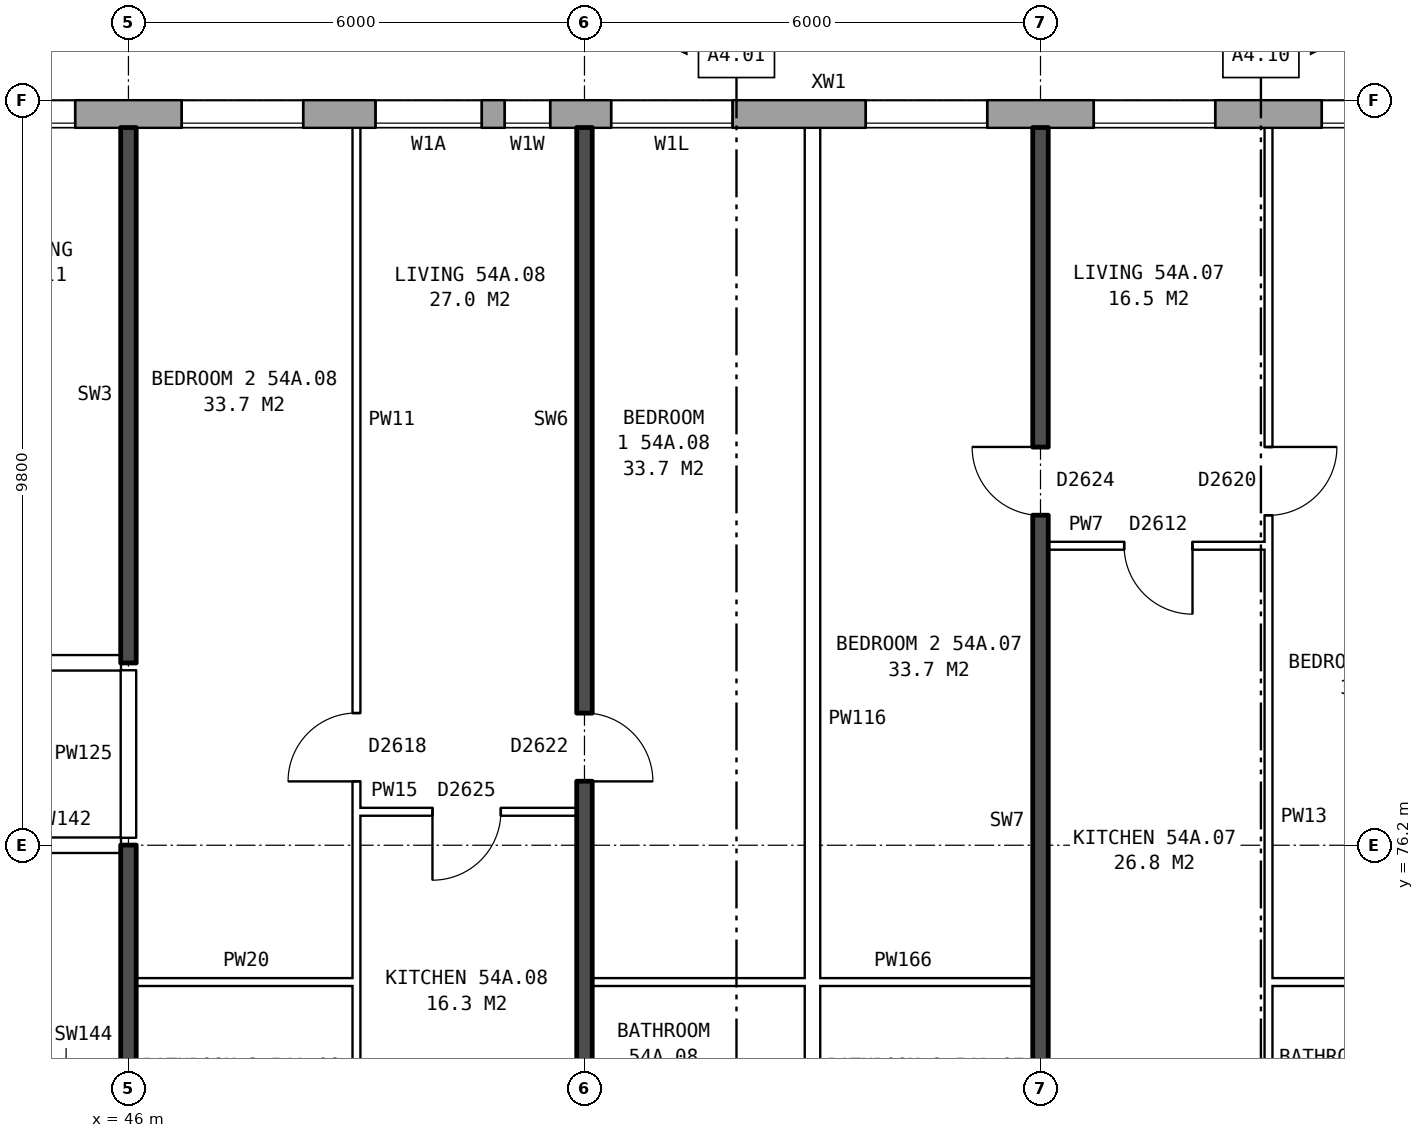
"""IFC4 building model, lengths in metres.
Left out: names, types, materials, properties, quantities, classifications, styles, units other than length and angle.
Written with IfcOpenShell. Run it as: python <this file> out.ifc"""

import sys

from ifc_helpers import new_model, si_unit, direction, frame, frame_2d, origin, place, context, subcontext, project, spatial, rectangle, extrude, element, fill, save


model = new_model("IFC4")
c1 = context("Model", 3, precision=1e-05, world=origin(), true_north=direction((0.0, 1.0)))
c2 = subcontext(c1, "Body", "Model", "MODEL_VIEW")
j1 = project(units=[si_unit("LENGTHUNIT", "METRE"), si_unit("PLANEANGLEUNIT", "RADIAN")], contexts=[c1])
p1 = place(None, origin())
s1 = spatial("IfcSite", under=j1, at=p1, CompositionType="ELEMENT")
p2 = place(p1, origin())
s2 = spatial("IfcBuilding", under=s1, at=p2, CompositionType="ELEMENT")
p3 = place(p2, frame((0.0, 0.0, 191.3)))
s3 = spatial("IfcBuildingStorey", under=s2, at=p3, CompositionType="ELEMENT", Elevation=191.3)
p4 = place(p3, frame((72.925, 85.82, 0.0), z_axis=(0.0, 0.0, 1.0), x_axis=(-1.0, 0.0, 0.0)))
e1 = element("IfcWall", 1, at=p4, inside=s3, PredefinedType="STANDARD", context=c2, shape_type="SweptSolid", body=[
    extrude(rectangle(XDim=39.601, YDim=0.36, at=frame_2d((19.8, 0.0))), origin(), (0.0, 0.0, 1.0), 2.85),
])
p5 = place(p4, frame((0.625, 0.0, 0.8)))
e2 = element("IfcOpeningElement", 2, at=p5, cuts=e1, PredefinedType="OPENING", context=c2, shape_type="SweptSolid", body=[
    extrude(rectangle(XDim=1.6, YDim=1.8, at=frame_2d((0.8, 0.9))), frame((0.0, 0.19, 0.0), z_axis=(0.0, -1.0, 0.0), x_axis=(1.0, 0.0, 0.0)), (0.0, 0.0, 1.0), 0.38),
])
p6 = place(p4, frame((3.625, 0.0, 0.8)))
e3 = element("IfcOpeningElement", 3, at=p6, cuts=e1, PredefinedType="OPENING", context=c2, shape_type="SweptSolid", body=[
    extrude(rectangle(XDim=1.6, YDim=1.8, at=frame_2d((0.8, 0.9))), frame((0.0, 0.19, 0.0), z_axis=(0.0, -1.0, 0.0), x_axis=(1.0, 0.0, 0.0)), (0.0, 0.0, 1.0), 0.38),
])
p7 = place(p4, frame((6.625, 0.0, 0.8)))
e4 = element("IfcOpeningElement", 4, at=p7, cuts=e1, PredefinedType="OPENING", context=c2, shape_type="SweptSolid", body=[
    extrude(rectangle(XDim=1.6, YDim=1.8, at=frame_2d((0.8, 0.9))), frame((0.0, 0.19, 0.0), z_axis=(0.0, -1.0, 0.0), x_axis=(1.0, 0.0, 0.0)), (0.0, 0.0, 1.0), 0.38),
])
p8 = place(p4, frame((9.625, 0.0, 0.8)))
e5 = element("IfcOpeningElement", 5, at=p8, cuts=e1, PredefinedType="OPENING", context=c2, shape_type="SweptSolid", body=[
    extrude(rectangle(XDim=1.6, YDim=1.8, at=frame_2d((0.8, 0.9))), frame((0.0, 0.19, 0.0), z_axis=(0.0, -1.0, 0.0), x_axis=(1.0, 0.0, 0.0)), (0.0, 0.0, 1.0), 0.38),
])
p9 = place(p4, frame((12.625, 0.0, 0.8)))
e6 = element("IfcOpeningElement", 6, at=p9, cuts=e1, PredefinedType="OPENING", context=c2, shape_type="SweptSolid", body=[
    extrude(rectangle(XDim=1.6, YDim=1.8, at=frame_2d((0.8, 0.9))), frame((0.0, 0.19, 0.0), z_axis=(0.0, -1.0, 0.0), x_axis=(1.0, 0.0, 0.0)), (0.0, 0.0, 1.0), 0.38),
])
p10 = place(p4, frame((15.625, 0.0, 0.8)))
e7 = element("IfcOpeningElement", 7, at=p10, cuts=e1, PredefinedType="OPENING", context=c2, shape_type="SweptSolid", body=[
    extrude(rectangle(XDim=1.6, YDim=1.8, at=frame_2d((0.8, 0.9))), frame((0.0, 0.19, 0.0), z_axis=(0.0, -1.0, 0.0), x_axis=(1.0, 0.0, 0.0)), (0.0, 0.0, 1.0), 0.38),
])
p11 = place(p4, frame((18.975, 0.0, 0.15)))
e8 = element("IfcOpeningElement", 8, at=p11, cuts=e1, PredefinedType="OPENING", context=c2, shape_type="SweptSolid", body=[
    extrude(rectangle(XDim=1.6, YDim=1.2, at=frame_2d((0.8, 0.6))), frame((0.0, 0.19, 0.0), z_axis=(0.0, -1.0, 0.0), x_axis=(1.0, 0.0, 0.0)), (0.0, 0.0, 1.0), 0.38),
])
p12 = place(p4, frame((21.375, 0.0, 1.7)))
e9 = element("IfcOpeningElement", 9, at=p12, cuts=e1, PredefinedType="OPENING", context=c2, shape_type="SweptSolid", body=[
    extrude(rectangle(XDim=0.6, YDim=0.9, at=frame_2d((0.3, 0.45))), frame((0.0, 0.19, 0.0), z_axis=(0.0, -1.0, 0.0), x_axis=(1.0, 0.0, 0.0)), (0.0, 0.0, 1.0), 0.38),
])
p13 = place(p4, frame((24.625, 0.0, 0.8)))
e10 = element("IfcOpeningElement", 10, at=p13, cuts=e1, PredefinedType="OPENING", context=c2, shape_type="SweptSolid", body=[
    extrude(rectangle(XDim=1.6, YDim=1.8, at=frame_2d((0.8, 0.9))), frame((0.0, 0.19, 0.0), z_axis=(0.0, -1.0, 0.0), x_axis=(1.0, 0.0, 0.0)), (0.0, 0.0, 1.0), 0.38),
])
p14 = place(p4, frame((27.625, 0.0, 0.8)))
e11 = element("IfcOpeningElement", 11, at=p14, cuts=e1, PredefinedType="OPENING", context=c2, shape_type="SweptSolid", body=[
    extrude(rectangle(XDim=1.6, YDim=1.8, at=frame_2d((0.8, 0.9))), frame((0.0, 0.19, 0.0), z_axis=(0.0, -1.0, 0.0), x_axis=(1.0, 0.0, 0.0)), (0.0, 0.0, 1.0), 0.38),
])
p15 = place(p4, frame((30.625, 0.0, 0.8)))
e12 = element("IfcOpeningElement", 12, at=p15, cuts=e1, PredefinedType="OPENING", context=c2, shape_type="SweptSolid", body=[
    extrude(rectangle(XDim=1.6, YDim=1.8, at=frame_2d((0.8, 0.9))), frame((0.0, 0.19, 0.0), z_axis=(0.0, -1.0, 0.0), x_axis=(1.0, 0.0, 0.0)), (0.0, 0.0, 1.0), 0.38),
])
p16 = place(p4, frame((33.625, 0.0, 0.8)))
e13 = element("IfcOpeningElement", 13, at=p16, cuts=e1, PredefinedType="OPENING", context=c2, shape_type="SweptSolid", body=[
    extrude(rectangle(XDim=1.6, YDim=1.8, at=frame_2d((0.8, 0.9))), frame((0.0, 0.19, 0.0), z_axis=(0.0, -1.0, 0.0), x_axis=(1.0, 0.0, 0.0)), (0.0, 0.0, 1.0), 0.38),
])
p17 = place(p4, frame((36.625, 0.0, 0.8)))
e14 = element("IfcOpeningElement", 14, at=p17, cuts=e1, PredefinedType="OPENING", context=c2, shape_type="SweptSolid", body=[
    extrude(rectangle(XDim=1.6, YDim=1.8, at=frame_2d((0.8, 0.9))), frame((0.0, 0.19, 0.0), z_axis=(0.0, -1.0, 0.0), x_axis=(1.0, 0.0, 0.0)), (0.0, 0.0, 1.0), 0.38),
])
p18 = place(p4, frame((22.275, 0.0, 0.8)))
e15 = element("IfcOpeningElement", 15, at=p18, cuts=e1, PredefinedType="OPENING", context=c2, shape_type="SweptSolid", body=[
    extrude(rectangle(XDim=1.4, YDim=1.8, at=frame_2d((0.7, 0.9))), frame((0.0, 0.19, 0.0), z_axis=(0.0, -1.0, 0.0), x_axis=(1.0, 0.0, 0.0)), (0.0, 0.0, 1.0), 0.38),
])
p19 = place(p3, frame((46.1, 74.4, 0.0), z_axis=(0.0, 0.0, 1.0), x_axis=(1.0, 0.0, 0.0)))
e16 = element("IfcWall", 16, at=p19, inside=s3, PredefinedType="PARTITIONING", context=c2, shape_type="SweptSolid", body=[
    extrude(rectangle(XDim=2.9, YDim=0.1, at=frame_2d((1.45, 0.0))), origin(), (0.0, 0.0, 1.0), 2.85),
])
p20 = place(p3, frame((52.1, 74.4, 0.0), z_axis=(0.0, 0.0, 1.0), x_axis=(1.0, 0.0, 0.0)))
e17 = element("IfcWall", 17, at=p20, inside=s3, PredefinedType="PARTITIONING", context=c2, shape_type="SweptSolid", body=[
    extrude(rectangle(XDim=5.8, YDim=0.1, at=frame_2d((2.9, 0.0))), origin(), (0.0, 0.0, 1.0), 2.85),
])
p21 = place(p3, frame((61.0, 74.4, 0.0), z_axis=(0.0, 0.0, 1.0), x_axis=(1.0, 0.0, 0.0)))
e18 = element("IfcWall", 18, at=p21, inside=s3, PredefinedType="PARTITIONING", context=c2, shape_type="SweptSolid", body=[
    extrude(rectangle(XDim=2.64, YDim=0.1, at=frame_2d((1.32, 0.0))), origin(), (0.0, 0.0, 1.0), 2.85),
])
p22 = place(p3, frame((44.36, 76.2, 0.0), z_axis=(0.0, 0.0, 1.0), x_axis=(1.0, 0.0, 0.0)))
e19 = element("IfcWall", 19, at=p22, inside=s3, PredefinedType="PARTITIONING", context=c2, shape_type="SweptSolid", body=[
    extrude(rectangle(XDim=1.54, YDim=0.2, at=frame_2d((0.77, 0.0))), origin(), (0.0, 0.0, 1.0), 2.85),
])
p23 = place(p3, frame((49.0, 76.64, 0.0), z_axis=(0.0, 0.0, 1.0), x_axis=(1.0, 0.0, 0.0)))
e20 = element("IfcWall", 20, at=p23, inside=s3, PredefinedType="PARTITIONING", context=c2, shape_type="SweptSolid", body=[
    extrude(rectangle(XDim=2.9, YDim=0.1, at=frame_2d((1.45, 0.0))), origin(), (0.0, 0.0, 1.0), 2.85),
])
p24 = place(p23, frame((1.0, 0.0, 0.0)))
e21 = element("IfcOpeningElement", 21, at=p24, cuts=e20, PredefinedType="OPENING", context=c2, shape_type="SweptSolid", body=[
    extrude(rectangle(XDim=0.9, YDim=2.1, at=frame_2d((0.45, 1.05))), frame((0.0, 0.06, 0.0), z_axis=(0.0, -1.0, 0.0), x_axis=(1.0, 0.0, 0.0)), (0.0, 0.0, 1.0), 0.12),
])
p25 = place(p3, frame((30.61, 78.6, 0.0), z_axis=(0.0, 0.0, 1.0), x_axis=(1.0, 0.0, 0.0)))
e22 = element("IfcWall", 22, at=p25, inside=s3, PredefinedType="PARTITIONING", context=c2, shape_type="SweptSolid", body=[
    extrude(rectangle(XDim=15.29, YDim=0.2, at=frame_2d((7.645, 0.0))), origin(), (0.0, 0.0, 1.0), 2.85),
])
p26 = place(p25, frame((12.84, 0.0, 0.0)))
e23 = element("IfcOpeningElement", 23, at=p26, cuts=e22, PredefinedType="OPENING", context=c2, shape_type="SweptSolid", body=[
    extrude(rectangle(XDim=1.0, YDim=2.1, at=frame_2d((0.5, 1.05))), frame((0.0, 0.11, 0.0), z_axis=(0.0, -1.0, 0.0), x_axis=(1.0, 0.0, 0.0)), (0.0, 0.0, 1.0), 0.22),
])
p27 = place(p25, frame((5.89, 0.0, 0.0)))
e24 = element("IfcOpeningElement", 24, at=p27, cuts=e22, PredefinedType="OPENING", context=c2, shape_type="SweptSolid", body=[
    extrude(rectangle(XDim=1.0, YDim=2.1, at=frame_2d((0.5, 1.05))), frame((0.0, 0.11, 0.0), z_axis=(0.0, -1.0, 0.0), x_axis=(1.0, 0.0, 0.0)), (0.0, 0.0, 1.0), 0.22),
])
p28 = place(p3, frame((58.1, 80.14, 0.0), z_axis=(0.0, 0.0, 1.0), x_axis=(1.0, 0.0, 0.0)))
e25 = element("IfcWall", 25, at=p28, inside=s3, PredefinedType="PARTITIONING", context=c2, shape_type="SweptSolid", body=[
    extrude(rectangle(XDim=2.9, YDim=0.1, at=frame_2d((1.45, 0.0))), origin(), (0.0, 0.0, 1.0), 2.85),
])
p29 = place(p28, frame((1.0, 0.0, 0.0)))
e26 = element("IfcOpeningElement", 26, at=p29, cuts=e25, PredefinedType="OPENING", context=c2, shape_type="SweptSolid", body=[
    extrude(rectangle(XDim=0.9, YDim=2.1, at=frame_2d((0.45, 1.05))), frame((0.0, 0.06, 0.0), z_axis=(0.0, -1.0, 0.0), x_axis=(1.0, 0.0, 0.0)), (0.0, 0.0, 1.0), 0.12),
])
p30 = place(p3, frame((46.0, 71.2, 0.0), z_axis=(0.0, 0.0, 1.0), x_axis=(0.0, 1.0, 0.0)))
e27 = element("IfcWall", 27, at=p30, inside=s3, PredefinedType="SOLIDWALL", context=c2, shape_type="SweptSolid", body=[
    extrude(rectangle(XDim=5.0, YDim=0.2, at=frame_2d((2.5, 0.0))), origin(), (0.0, 0.0, 1.0), 2.85),
])
p31 = place(p3, frame((46.0, 76.3, 0.0), z_axis=(0.0, 0.0, 1.0), x_axis=(0.0, 1.0, 0.0)))
e28 = element("IfcWall", 28, at=p31, inside=s3, PredefinedType="PARTITIONING", context=c2, shape_type="SweptSolid", body=[
    extrude(rectangle(XDim=2.2, YDim=0.2, at=frame_2d((1.1, 0.0))), origin(), (0.0, 0.0, 1.0), 2.85),
])
p32 = place(p3, frame((46.0, 78.6, 0.0), z_axis=(0.0, 0.0, 1.0), x_axis=(0.0, 1.0, 0.0)))
e29 = element("IfcWall", 29, at=p32, inside=s3, PredefinedType="SOLIDWALL", context=c2, shape_type="SweptSolid", body=[
    extrude(rectangle(XDim=7.04, YDim=0.2, at=frame_2d((3.52, 0.0))), origin(), (0.0, 0.0, 1.0), 2.85),
])
p33 = place(p3, frame((49.0, 71.3, 0.0), z_axis=(0.0, 0.0, 1.0), x_axis=(0.0, 1.0, 0.0)))
e30 = element("IfcWall", 30, at=p33, inside=s3, PredefinedType="PARTITIONING", context=c2, shape_type="SweptSolid", body=[
    extrude(rectangle(XDim=14.34, YDim=0.1, at=frame_2d((7.17, 0.0))), origin(), (0.0, 0.0, 1.0), 2.85),
])
p34 = place(p33, frame((5.74, 0.0, 0.0)))
e31 = element("IfcOpeningElement", 31, at=p34, cuts=e30, PredefinedType="OPENING", context=c2, shape_type="SweptSolid", body=[
    extrude(rectangle(XDim=0.9, YDim=2.1, at=frame_2d((0.45, 1.05))), frame((0.0, 0.06, 0.0), z_axis=(0.0, -1.0, 0.0), x_axis=(1.0, 0.0, 0.0)), (0.0, 0.0, 1.0), 0.12),
])
p35 = place(p33, frame((0.4, 0.0, 0.0)))
e32 = element("IfcOpeningElement", 32, at=p35, cuts=e30, PredefinedType="OPENING", context=c2, shape_type="SweptSolid", body=[
    extrude(rectangle(XDim=0.9, YDim=2.1, at=frame_2d((0.45, 1.05))), frame((0.0, 0.06, 0.0), z_axis=(0.0, -1.0, 0.0), x_axis=(1.0, 0.0, 0.0)), (0.0, 0.0, 1.0), 0.12),
])
p36 = place(p3, frame((52.0, 71.2, 0.0), z_axis=(0.0, 0.0, 1.0), x_axis=(0.0, 1.0, 0.0)))
e33 = element("IfcWall", 33, at=p36, inside=s3, PredefinedType="SOLIDWALL", context=c2, shape_type="SweptSolid", body=[
    extrude(rectangle(XDim=14.44, YDim=0.2, at=frame_2d((7.22, 0.0))), origin(), (0.0, 0.0, 1.0), 2.85),
])
p37 = place(p36, frame((5.84, 0.0, 0.0)))
e34 = element("IfcOpeningElement", 34, at=p37, cuts=e33, PredefinedType="OPENING", context=c2, shape_type="SweptSolid", body=[
    extrude(rectangle(XDim=0.9, YDim=2.1, at=frame_2d((0.45, 1.05))), frame((0.0, 0.11, 0.0), z_axis=(0.0, -1.0, 0.0), x_axis=(1.0, 0.0, 0.0)), (0.0, 0.0, 1.0), 0.22),
])
p38 = place(p36, frame((0.4, 0.0, 0.0)))
e35 = element("IfcOpeningElement", 35, at=p38, cuts=e33, PredefinedType="OPENING", context=c2, shape_type="SweptSolid", body=[
    extrude(rectangle(XDim=0.9, YDim=2.1, at=frame_2d((0.45, 1.05))), frame((0.0, 0.11, 0.0), z_axis=(0.0, -1.0, 0.0), x_axis=(1.0, 0.0, 0.0)), (0.0, 0.0, 1.0), 0.22),
])
p39 = place(p3, frame((55.0, 71.3, 0.0), z_axis=(0.0, 0.0, 1.0), x_axis=(0.0, 1.0, 0.0)))
e36 = element("IfcWall", 36, at=p39, inside=s3, PredefinedType="PARTITIONING", context=c2, shape_type="SweptSolid", body=[
    extrude(rectangle(XDim=14.34, YDim=0.2, at=frame_2d((7.17, 0.0))), origin(), (0.0, 0.0, 1.0), 2.85),
])
p40 = place(p3, frame((58.0, 71.2, 0.0), z_axis=(0.0, 0.0, 1.0), x_axis=(0.0, 1.0, 0.0)))
e37 = element("IfcWall", 37, at=p40, inside=s3, PredefinedType="SOLIDWALL", context=c2, shape_type="SweptSolid", body=[
    extrude(rectangle(XDim=14.44, YDim=0.2, at=frame_2d((7.22, 0.0))), origin(), (0.0, 0.0, 1.0), 2.85),
])
p41 = place(p40, frame((9.34, 0.0, 0.0)))
e38 = element("IfcOpeningElement", 38, at=p41, cuts=e37, PredefinedType="OPENING", context=c2, shape_type="SweptSolid", body=[
    extrude(rectangle(XDim=0.9, YDim=2.1, at=frame_2d((0.45, 1.05))), frame((0.0, 0.11, 0.0), z_axis=(0.0, -1.0, 0.0), x_axis=(1.0, 0.0, 0.0)), (0.0, 0.0, 1.0), 0.22),
])
p42 = place(p40, frame((0.4, 0.0, 0.0)))
e39 = element("IfcOpeningElement", 39, at=p42, cuts=e37, PredefinedType="OPENING", context=c2, shape_type="SweptSolid", body=[
    extrude(rectangle(XDim=0.9, YDim=2.1, at=frame_2d((0.45, 1.05))), frame((0.0, 0.11, 0.0), z_axis=(0.0, -1.0, 0.0), x_axis=(1.0, 0.0, 0.0)), (0.0, 0.0, 1.0), 0.22),
])
p43 = place(p3, frame((61.0, 71.3, 0.0), z_axis=(0.0, 0.0, 1.0), x_axis=(0.0, 1.0, 0.0)))
e40 = element("IfcWall", 40, at=p43, inside=s3, PredefinedType="PARTITIONING", context=c2, shape_type="SweptSolid", body=[
    extrude(rectangle(XDim=14.34, YDim=0.1, at=frame_2d((7.17, 0.0))), origin(), (0.0, 0.0, 1.0), 2.85),
])
p44 = place(p43, frame((9.24, 0.0, 0.0)))
e41 = element("IfcOpeningElement", 41, at=p44, cuts=e40, PredefinedType="OPENING", context=c2, shape_type="SweptSolid", body=[
    extrude(rectangle(XDim=0.9, YDim=2.1, at=frame_2d((0.45, 1.05))), frame((0.0, 0.06, 0.0), z_axis=(0.0, -1.0, 0.0), x_axis=(1.0, 0.0, 0.0)), (0.0, 0.0, 1.0), 0.12),
])
p45 = place(p43, frame((0.4, 0.0, 0.0)))
e42 = element("IfcOpeningElement", 42, at=p45, cuts=e40, PredefinedType="OPENING", context=c2, shape_type="SweptSolid", body=[
    extrude(rectangle(XDim=0.9, YDim=2.1, at=frame_2d((0.45, 1.05))), frame((0.0, 0.06, 0.0), z_axis=(0.0, -1.0, 0.0), x_axis=(1.0, 0.0, 0.0)), (0.0, 0.0, 1.0), 0.12),
])
p46 = place(p8, origin())
e43 = element("IfcWindow", 43, at=p46, inside=s3, PartitioningType="SINGLE_PANEL", PredefinedType="WINDOW", context=c2, shape_type="SweptSolid", body=[
    extrude(rectangle(XDim=1.6, YDim=1.8, at=frame_2d((0.8, 0.9))), frame((0.0, 0.15, 0.0), z_axis=(0.0, -1.0, 0.0), x_axis=(1.0, 0.0, 0.0)), (0.0, 0.0, 1.0), 0.06),
])
fill(e5, e43)
p47 = place(p9, origin())
e44 = element("IfcWindow", 44, at=p47, inside=s3, PartitioningType="SINGLE_PANEL", PredefinedType="WINDOW", context=c2, shape_type="SweptSolid", body=[
    extrude(rectangle(XDim=1.6, YDim=1.8, at=frame_2d((0.8, 0.9))), frame((0.0, 0.15, 0.0), z_axis=(0.0, -1.0, 0.0), x_axis=(1.0, 0.0, 0.0)), (0.0, 0.0, 1.0), 0.06),
])
fill(e6, e44)
p48 = place(p10, origin())
e45 = element("IfcWindow", 45, at=p48, inside=s3, PartitioningType="SINGLE_PANEL", PredefinedType="WINDOW", context=c2, shape_type="SweptSolid", body=[
    extrude(rectangle(XDim=1.6, YDim=1.8, at=frame_2d((0.8, 0.9))), frame((0.0, 0.15, 0.0), z_axis=(0.0, -1.0, 0.0), x_axis=(1.0, 0.0, 0.0)), (0.0, 0.0, 1.0), 0.06),
])
fill(e7, e45)
p49 = place(p11, origin())
e46 = element("IfcWindow", 46, at=p49, inside=s3, PartitioningType="SINGLE_PANEL", PredefinedType="WINDOW", context=c2, shape_type="SweptSolid", body=[
    extrude(rectangle(XDim=1.6, YDim=1.2, at=frame_2d((0.8, 0.6))), frame((0.0, 0.15, 0.0), z_axis=(0.0, -1.0, 0.0), x_axis=(1.0, 0.0, 0.0)), (0.0, 0.0, 1.0), 0.06),
])
fill(e8, e46)
p50 = place(p12, origin())
e47 = element("IfcWindow", 47, at=p50, inside=s3, PartitioningType="SINGLE_PANEL", PredefinedType="WINDOW", context=c2, shape_type="SweptSolid", body=[
    extrude(rectangle(XDim=0.6, YDim=0.9, at=frame_2d((0.3, 0.45))), frame((0.0, 0.15, 0.0), z_axis=(0.0, -1.0, 0.0), x_axis=(1.0, 0.0, 0.0)), (0.0, 0.0, 1.0), 0.06),
])
fill(e9, e47)
p51 = place(p13, origin())
e48 = element("IfcWindow", 48, at=p51, inside=s3, PartitioningType="SINGLE_PANEL", PredefinedType="WINDOW", context=c2, shape_type="SweptSolid", body=[
    extrude(rectangle(XDim=1.6, YDim=1.8, at=frame_2d((0.8, 0.9))), frame((0.0, 0.15, 0.0), z_axis=(0.0, -1.0, 0.0), x_axis=(1.0, 0.0, 0.0)), (0.0, 0.0, 1.0), 0.06),
])
fill(e10, e48)
p52 = place(p14, origin())
e49 = element("IfcWindow", 49, at=p52, inside=s3, PartitioningType="SINGLE_PANEL", PredefinedType="WINDOW", context=c2, shape_type="SweptSolid", body=[
    extrude(rectangle(XDim=1.6, YDim=1.8, at=frame_2d((0.8, 0.9))), frame((0.0, 0.15, 0.0), z_axis=(0.0, -1.0, 0.0), x_axis=(1.0, 0.0, 0.0)), (0.0, 0.0, 1.0), 0.06),
])
fill(e11, e49)
p53 = place(p44, frame((0.9, 0.0, 0.0), z_axis=(0.0, 0.0, 1.0), x_axis=(-1.0, 0.0, 0.0)))
e50 = element("IfcDoor", 50, at=p53, inside=s3, OperationType="SINGLE_SWING_LEFT", PredefinedType="DOOR", context=c2, shape_type="SweptSolid", body=[
    extrude(rectangle(XDim=0.9, YDim=2.1, at=frame_2d((0.45, 1.05))), frame((0.0, 0.025, 0.0), z_axis=(0.0, -1.0, 0.0), x_axis=(1.0, 0.0, 0.0)), (0.0, 0.0, 1.0), 0.05),
])
fill(e41, e50)
p54 = place(p41, origin())
e51 = element("IfcDoor", 51, at=p54, inside=s3, OperationType="SINGLE_SWING_RIGHT", PredefinedType="DOOR", context=c2, shape_type="SweptSolid", body=[
    extrude(rectangle(XDim=0.9, YDim=2.1, at=frame_2d((0.45, 1.05))), frame((0.0, 0.025, 0.0), z_axis=(0.0, -1.0, 0.0), x_axis=(1.0, 0.0, 0.0)), (0.0, 0.0, 1.0), 0.05),
])
fill(e38, e51)
p55 = place(p29, frame((0.9, 0.0, 0.0), z_axis=(0.0, 0.0, 1.0), x_axis=(-1.0, 0.0, 0.0)))
e52 = element("IfcDoor", 52, at=p55, inside=s3, OperationType="SINGLE_SWING_LEFT", PredefinedType="DOOR", context=c2, shape_type="SweptSolid", body=[
    extrude(rectangle(XDim=0.9, YDim=2.1, at=frame_2d((0.45, 1.05))), frame((0.0, 0.025, 0.0), z_axis=(0.0, -1.0, 0.0), x_axis=(1.0, 0.0, 0.0)), (0.0, 0.0, 1.0), 0.05),
])
fill(e26, e52)
p56 = place(p37, frame((0.9, 0.0, 0.0), z_axis=(0.0, 0.0, 1.0), x_axis=(-1.0, 0.0, 0.0)))
e53 = element("IfcDoor", 53, at=p56, inside=s3, OperationType="SINGLE_SWING_RIGHT", PredefinedType="DOOR", context=c2, shape_type="SweptSolid", body=[
    extrude(rectangle(XDim=0.9, YDim=2.1, at=frame_2d((0.45, 1.05))), frame((0.0, 0.025, 0.0), z_axis=(0.0, -1.0, 0.0), x_axis=(1.0, 0.0, 0.0)), (0.0, 0.0, 1.0), 0.05),
])
fill(e34, e53)
p57 = place(p34, origin())
e54 = element("IfcDoor", 54, at=p57, inside=s3, OperationType="SINGLE_SWING_LEFT", PredefinedType="DOOR", context=c2, shape_type="SweptSolid", body=[
    extrude(rectangle(XDim=0.9, YDim=2.1, at=frame_2d((0.45, 1.05))), frame((0.0, 0.025, 0.0), z_axis=(0.0, -1.0, 0.0), x_axis=(1.0, 0.0, 0.0)), (0.0, 0.0, 1.0), 0.05),
])
fill(e31, e54)
p58 = place(p24, frame((0.9, 0.0, 0.0), z_axis=(0.0, 0.0, 1.0), x_axis=(-1.0, 0.0, 0.0)))
e55 = element("IfcDoor", 55, at=p58, inside=s3, OperationType="SINGLE_SWING_RIGHT", PredefinedType="DOOR", context=c2, shape_type="SweptSolid", body=[
    extrude(rectangle(XDim=0.9, YDim=2.1, at=frame_2d((0.45, 1.05))), frame((0.0, 0.025, 0.0), z_axis=(0.0, -1.0, 0.0), x_axis=(1.0, 0.0, 0.0)), (0.0, 0.0, 1.0), 0.05),
])
fill(e21, e55)
p59 = place(p18, origin())
e56 = element("IfcWindow", 56, at=p59, inside=s3, PartitioningType="SINGLE_PANEL", PredefinedType="WINDOW", context=c2, shape_type="SweptSolid", body=[
    extrude(rectangle(XDim=1.4, YDim=1.8, at=frame_2d((0.7, 0.9))), frame((0.0, 0.15, 0.0), z_axis=(0.0, -1.0, 0.0), x_axis=(1.0, 0.0, 0.0)), (0.0, 0.0, 1.0), 0.06),
])
fill(e15, e56)
save(model, sys.argv[1])
